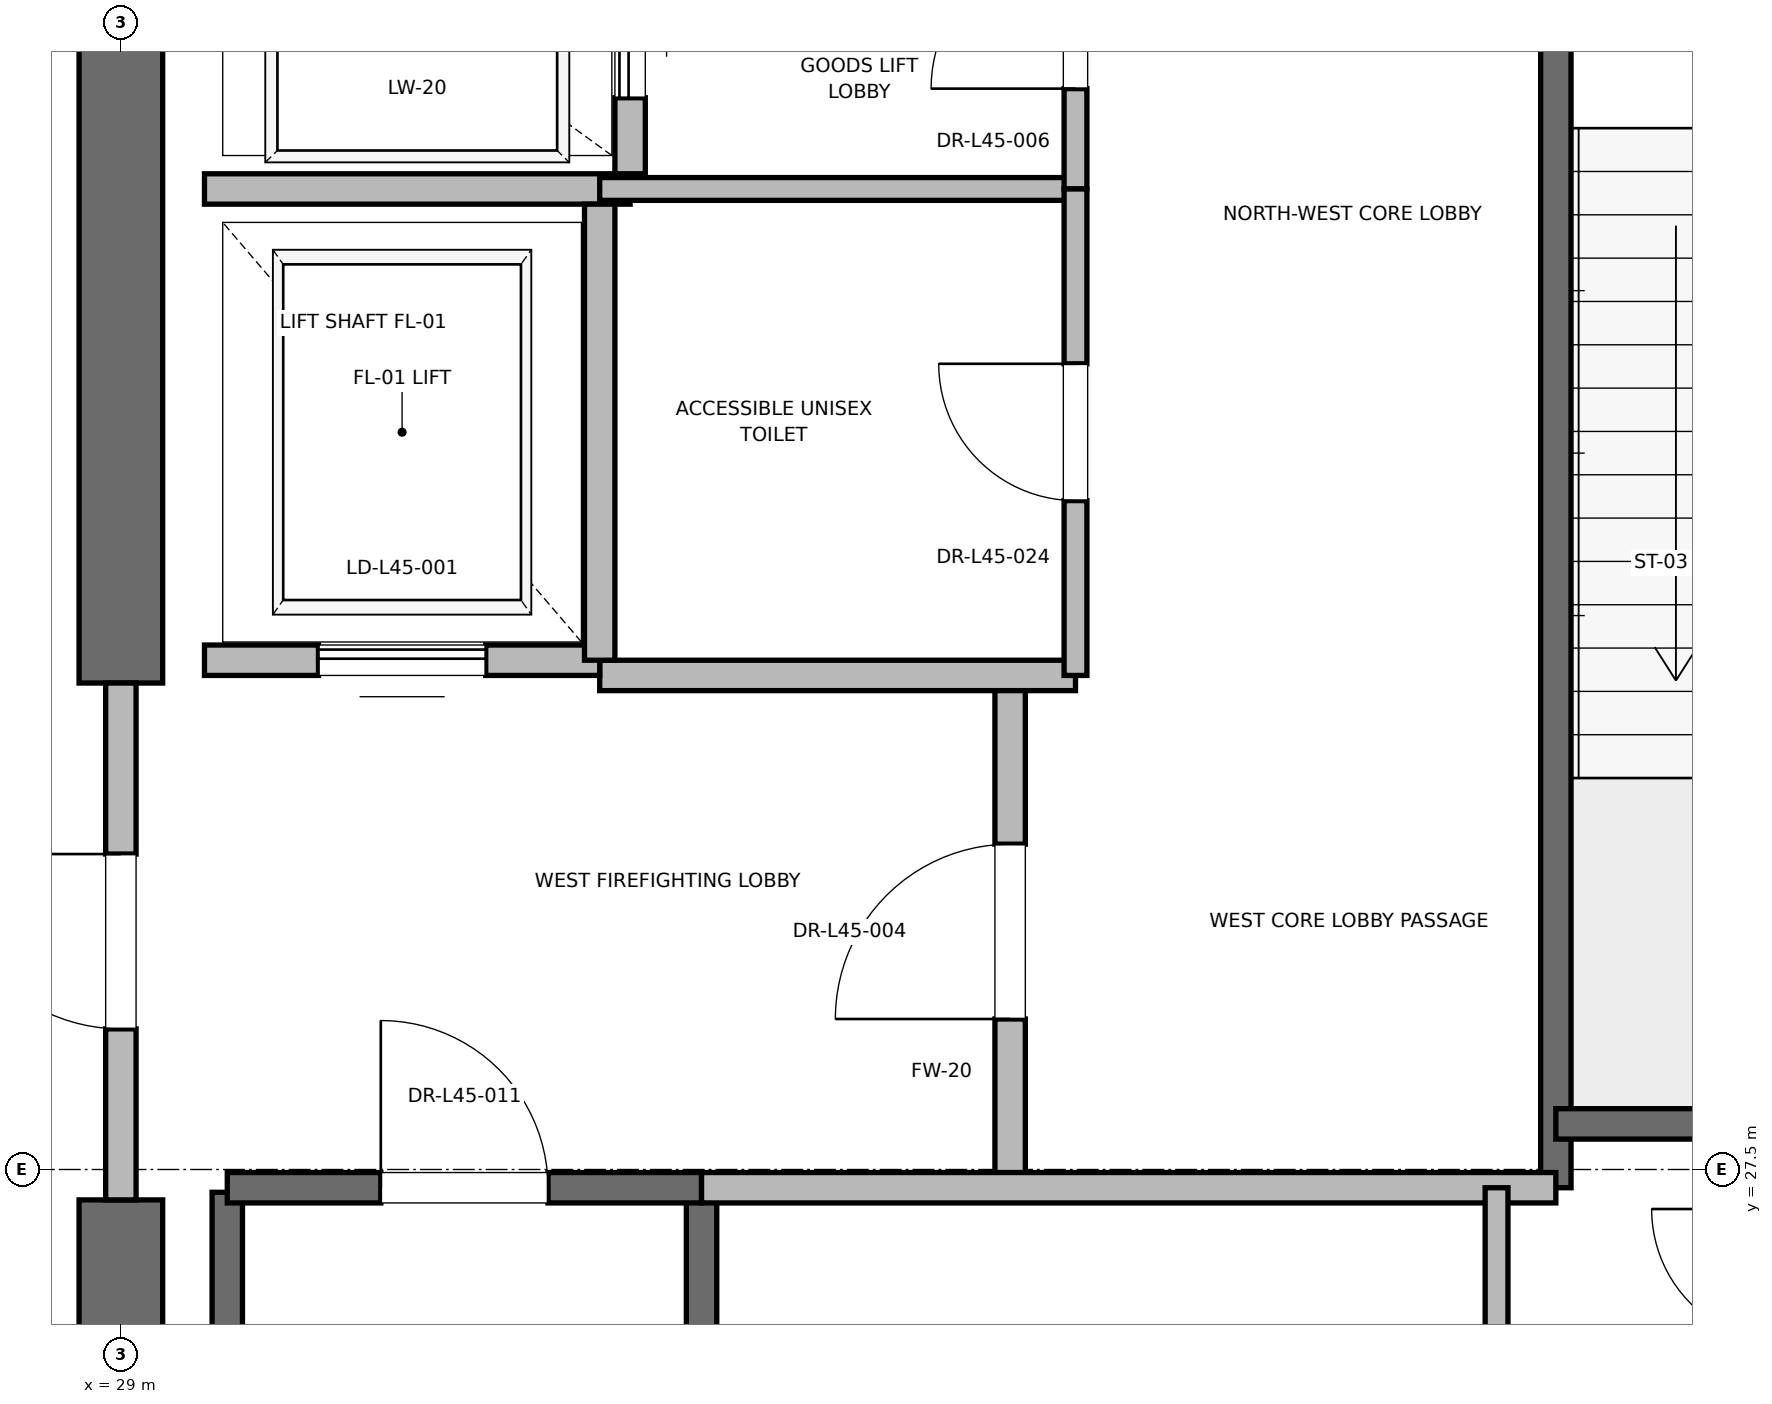
"""IFC4 building model, lengths in metres.
Left out: names, types, materials, properties, quantities, classifications, styles, units other than length and angle.
Written with IfcOpenShell. Run it as: python <this file> out.ifc"""

import sys

from ifc_helpers import new_model, si_unit, direction, frame, frame_2d, origin, place, context, subcontext, project, spatial, rectangle, extrude, element, fill, save


model = new_model("IFC4")
c1 = context("Model", 3, precision=1e-05, world=origin(), true_north=direction((0.0, 1.0)))
c2 = subcontext(c1, "Body", "Model", "MODEL_VIEW")
j1 = project(units=[si_unit("LENGTHUNIT", "METRE"), si_unit("PLANEANGLEUNIT", "RADIAN")], contexts=[c1])
p1 = place(None, origin())
s1 = spatial("IfcSite", under=j1, at=p1, CompositionType="ELEMENT")
p2 = place(p1, origin())
s2 = spatial("IfcBuilding", under=s1, at=p2, CompositionType="ELEMENT")
p3 = place(p2, frame((0.0, 0.0, 194.8)))
s3 = spatial("IfcBuildingStorey", under=s2, at=p3, CompositionType="ELEMENT", Elevation=194.8)
p4 = place(p3, frame((29.0, 18.5, 0.0), z_axis=(0.0, 0.0, 1.0), x_axis=(0.0, 1.0, 0.0)))
e1 = element("IfcWall", 1, at=p4, inside=s3, PredefinedType="SHEAR", context=c2, shape_type="SweptSolid", body=[
    extrude(rectangle(XDim=8.8, YDim=0.55, at=frame_2d((4.4, 0.0))), origin(), (0.0, 0.0, 1.0), 5.1),
])
p5 = place(p3, frame((29.0, 30.7, 0.0), z_axis=(0.0, 0.0, 1.0), x_axis=(0.0, 1.0, 0.0)))
e2 = element("IfcWall", 2, at=p5, inside=s3, PredefinedType="SHEAR", context=c2, shape_type="SweptSolid", body=[
    extrude(rectangle(XDim=5.8, YDim=0.55, at=frame_2d((2.9, 0.0))), origin(), (0.0, 0.0, 1.0), 5.1),
])
p6 = place(p3, frame((29.7, 19.2, 0.0), z_axis=(0.0, 0.0, 1.0), x_axis=(0.0, 1.0, 0.0)))
e3 = element("IfcWall", 3, at=p6, inside=s3, PredefinedType="SOLIDWALL", context=c2, shape_type="SweptSolid", body=[
    extrude(rectangle(XDim=8.15, YDim=0.2, at=frame_2d((4.075, 0.0))), origin(), (0.0, 0.0, 1.0), 5.1),
])
p7 = place(p3, frame((32.82, 18.6, 0.0), z_axis=(0.0, 0.0, 1.0), x_axis=(0.0, 1.0, 0.0)))
e4 = element("IfcWall", 4, at=p7, inside=s3, PredefinedType="SOLIDWALL", context=c2, shape_type="SweptSolid", body=[
    extrude(rectangle(XDim=8.78, YDim=0.2, at=frame_2d((4.39, 0.0))), origin(), (0.0, 0.0, 1.0), 5.1),
])
p8 = place(p3, frame((29.7, 27.38, 0.0), z_axis=(0.0, 0.0, 1.0), x_axis=(1.0, 0.0, 0.0)))
e5 = element("IfcWall", 5, at=p8, inside=s3, PredefinedType="SOLIDWALL", context=c2, shape_type="SweptSolid", body=[
    extrude(rectangle(XDim=3.12, YDim=0.2, at=frame_2d((1.56, 0.0))), origin(), (0.0, 0.0, 1.0), 5.1),
])
p9 = place(p8, frame((1.01, 0.0, 0.0)))
e6 = element("IfcOpeningElement", 6, at=p9, cuts=e5, PredefinedType="OPENING", context=c2, shape_type="SweptSolid", body=[
    extrude(rectangle(XDim=1.1, YDim=2.15, at=frame_2d((0.55, 1.075))), frame((0.0, 0.1, 0.0), z_axis=(0.0, -1.0, 0.0), x_axis=(1.0, 0.0, 0.0)), (0.0, 0.0, 1.0), 0.2),
])
p10 = place(p3, frame((38.44, 27.38, 0.0), z_axis=(0.0, 0.0, 1.0), x_axis=(0.0, 1.0, 0.0)))
e7 = element("IfcWall", 7, at=p10, inside=s3, PredefinedType="SOLIDWALL", context=c2, shape_type="SweptSolid", body=[
    extrude(rectangle(XDim=8.87, YDim=0.2, at=frame_2d((4.435, 0.0))), origin(), (0.0, 0.0, 1.0), 5.1),
])
p11 = place(p3, frame((38.44, 27.8, 0.0), z_axis=(0.0, 0.0, 1.0), x_axis=(1.0, 0.0, 0.0)))
e8 = element("IfcWall", 8, at=p11, inside=s3, PredefinedType="SOLIDWALL", context=c2, shape_type="SweptSolid", body=[
    extrude(rectangle(XDim=3.32, YDim=0.2, at=frame_2d((1.66, 0.0))), origin(), (0.0, 0.0, 1.0), 5.1),
])
p12 = place(p3, frame((34.85, 27.38, 0.0), z_axis=(0.0, 0.0, 1.0), x_axis=(0.0, 1.0, 0.0)))
e9 = element("IfcWall", 9, at=p12, inside=s3, PredefinedType="PARTITIONING", context=c2, shape_type="SweptSolid", body=[
    extrude(rectangle(XDim=3.37, YDim=0.2, at=frame_2d((1.685, 0.0))), origin(), (0.0, 0.0, 1.0), 5.1),
])
p13 = place(p12, frame((1.11, 0.0, 0.0)))
e10 = element("IfcOpeningElement", 10, at=p13, cuts=e9, PredefinedType="OPENING", context=c2, shape_type="SweptSolid", body=[
    extrude(rectangle(XDim=1.15, YDim=2.2, at=frame_2d((0.575, 1.1))), frame((0.0, 0.1, 0.0), z_axis=(0.0, -1.0, 0.0), x_axis=(1.0, 0.0, 0.0)), (0.0, 0.0, 1.0), 0.2),
])
p14 = place(p3, frame((29.0, 27.3, 0.0), z_axis=(0.0, 0.0, 1.0), x_axis=(0.0, 1.0, 0.0)))
e11 = element("IfcWall", 11, at=p14, inside=s3, PredefinedType="PARTITIONING", context=c2, shape_type="SweptSolid", body=[
    extrude(rectangle(XDim=3.4, YDim=0.2, at=frame_2d((1.7, 0.0))), origin(), (0.0, 0.0, 1.0), 4.08),
])
p15 = place(p14, frame((1.125, 0.0, 0.0)))
e12 = element("IfcOpeningElement", 12, at=p15, cuts=e11, PredefinedType="OPENING", context=c2, shape_type="SweptSolid", body=[
    extrude(rectangle(XDim=1.15, YDim=2.2, at=frame_2d((0.575, 1.1))), frame((0.0, 0.1, 0.0), z_axis=(0.0, -1.0, 0.0), x_axis=(1.0, 0.0, 0.0)), (0.0, 0.0, 1.0), 0.2),
])
p16 = place(p3, frame((32.82, 27.38, 0.0), z_axis=(0.0, 0.0, 1.0), x_axis=(1.0, 0.0, 0.0)))
e13 = element("IfcWall", 13, at=p16, inside=s3, PredefinedType="PARTITIONING", context=c2, shape_type="SweptSolid", body=[
    extrude(rectangle(XDim=5.62, YDim=0.2, at=frame_2d((2.81, 0.0))), origin(), (0.0, 0.0, 1.0), 5.1),
])
p17 = place(p3, frame((32.15, 30.75, 0.0), z_axis=(0.0, 0.0, 1.0), x_axis=(1.0, 0.0, 0.0)))
e14 = element("IfcWall", 14, at=p17, inside=s3, PredefinedType="PARTITIONING", context=c2, shape_type="SweptSolid", body=[
    extrude(rectangle(XDim=3.13, YDim=0.2, at=frame_2d((1.565, 0.0))), origin(), (0.0, 0.0, 1.0), 5.1),
])
p18 = place(p3, frame((29.55, 30.85, 0.0), z_axis=(0.0, 0.0, 1.0), x_axis=(1.0, 0.0, 0.0)))
e15 = element("IfcWall", 15, at=p18, inside=s3, PredefinedType="SOLIDWALL", context=c2, shape_type="SweptSolid", body=[
    extrude(rectangle(XDim=2.6, YDim=0.2, at=frame_2d((1.3, 0.0))), origin(), (0.0, 0.0, 1.0), 4.08),
])
p19 = place(p18, frame((0.75, 0.0, 0.0)))
e16 = element("IfcOpeningElement", 16, at=p19, cuts=e15, PredefinedType="OPENING", context=c2, shape_type="SweptSolid", body=[
    extrude(rectangle(XDim=1.1, YDim=2.2, at=frame_2d((0.55, 1.1))), frame((0.0, 0.1, 0.0), z_axis=(0.0, -1.0, 0.0), x_axis=(1.0, 0.0, 0.0)), (0.0, 0.0, 1.0), 0.2),
])
p20 = place(p3, frame((29.55, 33.95, 0.0), z_axis=(0.0, 0.0, 1.0), x_axis=(1.0, 0.0, 0.0)))
e17 = element("IfcWall", 17, at=p20, inside=s3, PredefinedType="SOLIDWALL", context=c2, shape_type="SweptSolid", body=[
    extrude(rectangle(XDim=2.8, YDim=0.2, at=frame_2d((1.4, 0.0))), origin(), (0.0, 0.0, 1.0), 5.1),
])
p21 = place(p3, frame((32.15, 30.85, 0.0), z_axis=(0.0, 0.0, 1.0), x_axis=(0.0, 1.0, 0.0)))
e18 = element("IfcWall", 18, at=p21, inside=s3, PredefinedType="SOLIDWALL", context=c2, shape_type="SweptSolid", body=[
    extrude(rectangle(XDim=3.0, YDim=0.2, at=frame_2d((1.5, 0.0))), origin(), (0.0, 0.0, 1.0), 5.1),
])
p22 = place(p3, frame((32.35, 34.05, 0.0), z_axis=(0.0, 0.0, 1.0), x_axis=(0.0, 1.0, 0.0)))
e19 = element("IfcWall", 19, at=p22, inside=s3, PredefinedType="SOLIDWALL", context=c2, shape_type="SweptSolid", body=[
    extrude(rectangle(XDim=2.1, YDim=0.2, at=frame_2d((1.05, 0.0))), origin(), (0.0, 0.0, 1.0), 5.1),
])
p23 = place(p22, frame((0.5, 0.0, 0.0)))
e20 = element("IfcOpeningElement", 20, at=p23, cuts=e19, PredefinedType="OPENING", context=c2, shape_type="SweptSolid", body=[
    extrude(rectangle(XDim=1.1, YDim=2.2, at=frame_2d((0.55, 1.1))), frame((0.0, 0.1, 0.0), z_axis=(0.0, -1.0, 0.0), x_axis=(1.0, 0.0, 0.0)), (0.0, 0.0, 1.0), 0.2),
])
p24 = place(p3, frame((32.15, 33.95, 0.0), z_axis=(0.0, 0.0, 1.0), x_axis=(1.0, 0.0, 0.0)))
e21 = element("IfcWall", 21, at=p24, inside=s3, PredefinedType="PARTITIONING", context=c2, shape_type="SweptSolid", body=[
    extrude(rectangle(XDim=3.13, YDim=0.15, at=frame_2d((1.565, 0.0))), origin(), (0.0, 0.0, 1.0), 2.85),
])
p25 = place(p3, frame((35.28, 33.95, 0.0), z_axis=(0.0, 0.0, 1.0), x_axis=(0.0, 1.0, 0.0)))
e22 = element("IfcWall", 22, at=p25, inside=s3, PredefinedType="PARTITIONING", context=c2, shape_type="SweptSolid", body=[
    extrude(rectangle(XDim=2.27, YDim=0.15, at=frame_2d((1.135, 0.0))), origin(), (0.0, 0.0, 1.0), 2.85),
])
p26 = place(p25, frame((0.66, 0.0, 0.0)))
e23 = element("IfcOpeningElement", 23, at=p26, cuts=e22, PredefinedType="OPENING", context=c2, shape_type="SweptSolid", body=[
    extrude(rectangle(XDim=0.95, YDim=2.15, at=frame_2d((0.475, 1.075))), frame((0.0, 0.075, 0.0), z_axis=(0.0, -1.0, 0.0), x_axis=(1.0, 0.0, 0.0)), (0.0, 0.0, 1.0), 0.15),
])
p27 = place(p3, frame((35.28, 30.75, 0.0), z_axis=(0.0, 0.0, 1.0), x_axis=(0.0, 1.0, 0.0)))
e24 = element("IfcWall", 24, at=p27, inside=s3, PredefinedType="PARTITIONING", context=c2, shape_type="SweptSolid", body=[
    extrude(rectangle(XDim=3.2, YDim=0.15, at=frame_2d((1.6, 0.0))), origin(), (0.0, 0.0, 1.0), 2.85),
])
p28 = place(p27, frame((1.15, 0.0, 0.0)))
e25 = element("IfcOpeningElement", 25, at=p28, cuts=e24, PredefinedType="OPENING", context=c2, shape_type="SweptSolid", body=[
    extrude(rectangle(XDim=0.9, YDim=2.1, at=frame_2d((0.45, 1.05))), frame((0.0, 0.075, 0.0), z_axis=(0.0, -1.0, 0.0), x_axis=(1.0, 0.0, 0.0)), (0.0, 0.0, 1.0), 0.15),
])
p29 = place(p3, frame((38.05, 24.5, 0.0), z_axis=(0.0, 0.0, 1.0), x_axis=(0.0, 1.0, 0.0)))
e26 = element("IfcWall", 26, at=p29, inside=s3, PredefinedType="PARTITIONING", context=c2, shape_type="SweptSolid", body=[
    extrude(rectangle(XDim=2.88, YDim=0.15, at=frame_2d((1.44, 0.0))), origin(), (0.0, 0.0, 1.0), 2.85),
])
p30 = place(p29, frame((1.0, 0.0, 0.0)))
e27 = element("IfcOpeningElement", 27, at=p30, cuts=e26, PredefinedType="OPENING", context=c2, shape_type="SweptSolid", body=[
    extrude(rectangle(XDim=0.88, YDim=2.1, at=frame_2d((0.44, 1.05))), frame((0.0, 0.075, 0.0), z_axis=(0.0, -1.0, 0.0), x_axis=(1.0, 0.0, 0.0)), (0.0, 0.0, 1.0), 0.15),
])
p31 = place(p9, origin())
e28 = element("IfcDoor", 28, at=p31, inside=s3, OperationType="SINGLE_SWING_LEFT", PredefinedType="DOOR", context=c2, shape_type="SweptSolid", body=[
    extrude(rectangle(XDim=1.1, YDim=2.15, at=frame_2d((0.55, 1.075))), frame((0.0, 0.025, 0.0), z_axis=(0.0, -1.0, 0.0), x_axis=(1.0, 0.0, 0.0)), (0.0, 0.0, 1.0), 0.05),
])
fill(e6, e28)
p32 = place(p13, origin())
e29 = element("IfcDoor", 29, at=p32, inside=s3, OperationType="SINGLE_SWING_LEFT", PredefinedType="DOOR", context=c2, shape_type="SweptSolid", body=[
    extrude(rectangle(XDim=1.15, YDim=2.2, at=frame_2d((0.575, 1.1))), frame((0.0, 0.025, 0.0), z_axis=(0.0, -1.0, 0.0), x_axis=(1.0, 0.0, 0.0)), (0.0, 0.0, 1.0), 0.05),
])
fill(e10, e29)
p33 = place(p15, origin())
e30 = element("IfcDoor", 30, at=p33, inside=s3, OperationType="SINGLE_SWING_RIGHT", PredefinedType="DOOR", context=c2, shape_type="SweptSolid", body=[
    extrude(rectangle(XDim=1.15, YDim=2.2, at=frame_2d((0.575, 1.1))), frame((0.0, 0.025, 0.0), z_axis=(0.0, -1.0, 0.0), x_axis=(1.0, 0.0, 0.0)), (0.0, 0.0, 1.0), 0.05),
])
fill(e12, e30)
p34 = place(p19, origin())
e31 = element("IfcDoor", 31, at=p34, inside=s3, OperationType="SLIDING_TO_RIGHT", PredefinedType="DOOR", context=c2, shape_type="SweptSolid", body=[
    extrude(rectangle(XDim=1.1, YDim=2.2, at=frame_2d((0.55, 1.1))), frame((0.0, 0.025, 0.0), z_axis=(0.0, -1.0, 0.0), x_axis=(1.0, 0.0, 0.0)), (0.0, 0.0, 1.0), 0.05),
])
fill(e16, e31)
p35 = place(p23, origin())
e32 = element("IfcDoor", 32, at=p35, inside=s3, OperationType="SLIDING_TO_RIGHT", PredefinedType="DOOR", context=c2, shape_type="SweptSolid", body=[
    extrude(rectangle(XDim=1.1, YDim=2.2, at=frame_2d((0.55, 1.1))), frame((0.0, 0.025, 0.0), z_axis=(0.0, -1.0, 0.0), x_axis=(1.0, 0.0, 0.0)), (0.0, 0.0, 1.0), 0.05),
])
fill(e20, e32)
p36 = place(p26, origin())
e33 = element("IfcDoor", 33, at=p36, inside=s3, OperationType="SINGLE_SWING_LEFT", PredefinedType="DOOR", context=c2, shape_type="SweptSolid", body=[
    extrude(rectangle(XDim=0.95, YDim=2.15, at=frame_2d((0.475, 1.075))), frame((0.0, 0.025, 0.0), z_axis=(0.0, -1.0, 0.0), x_axis=(1.0, 0.0, 0.0)), (0.0, 0.0, 1.0), 0.05),
])
fill(e23, e33)
p37 = place(p28, origin())
e34 = element("IfcDoor", 34, at=p37, inside=s3, OperationType="SINGLE_SWING_RIGHT", PredefinedType="DOOR", context=c2, shape_type="SweptSolid", body=[
    extrude(rectangle(XDim=0.9, YDim=2.1, at=frame_2d((0.45, 1.05))), frame((0.0, 0.025, 0.0), z_axis=(0.0, -1.0, 0.0), x_axis=(1.0, 0.0, 0.0)), (0.0, 0.0, 1.0), 0.05),
])
fill(e25, e34)
save(model, sys.argv[1])
